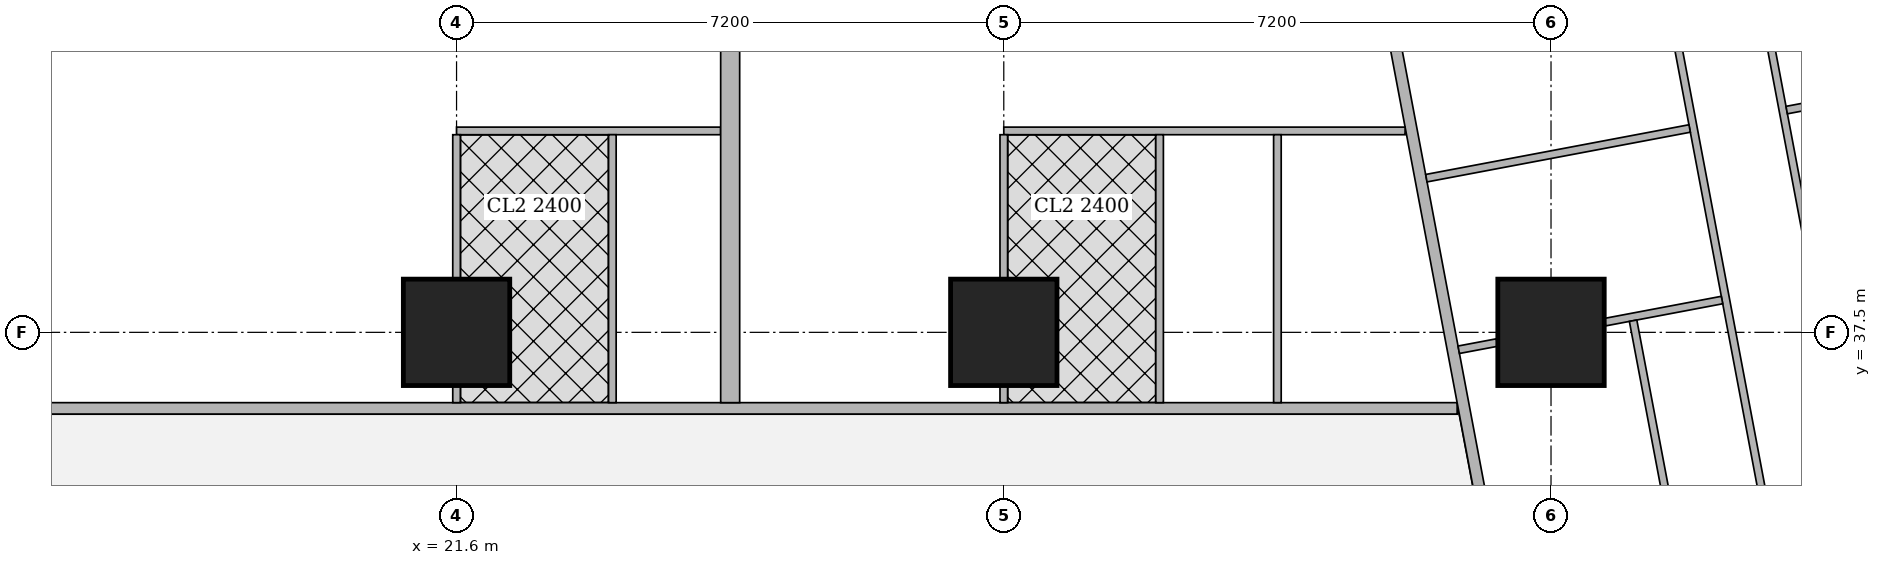
"""IFC4 building model, lengths in metres.
Left out: names, types, materials, properties, quantities, classifications, styles, units other than length and angle.
Written with IfcOpenShell. Run it as: python <this file> out.ifc"""

import sys

from ifc_helpers import new_model, si_unit, direction, frame, frame_2d, origin, origin_2d, place, context, subcontext, project, spatial, rectangle, extrude, element, fill, save


model = new_model("IFC4")
c1 = context("Model", 3, precision=1e-05, world=origin(), true_north=direction((0.0, 1.0)))
c2 = subcontext(c1, "Body", "Model", "MODEL_VIEW")
j1 = project(units=[si_unit("LENGTHUNIT", "METRE"), si_unit("PLANEANGLEUNIT", "RADIAN")], contexts=[c1])
p1 = place(None, origin())
s1 = spatial("IfcSite", under=j1, at=p1, CompositionType="ELEMENT")
p2 = place(p1, origin())
s2 = spatial("IfcBuilding", under=s1, at=p2, CompositionType="ELEMENT")
p3 = place(p2, frame((0.0, 0.0, 223.7)))
s3 = spatial("IfcBuildingStorey", under=s2, at=p3, CompositionType="ELEMENT", Elevation=223.7)
for number, where, z_axis, x_axis in (
    (1, (21.6, 37.5, 0.0), (0.0, 0.0, 1.0), (1.0, 0.0, 0.0)),
    (2, (28.8, 37.5, 0.0), (0.0, 0.0, 1.0), (1.0, 0.0, 0.0)),
    (3, (36.0, 37.5, 0.0), (0.0, 0.0, 1.0), (1.0, 0.0, 0.0)),
):
    element("IfcColumn", number, at=place(p3, frame(where, z_axis=z_axis, x_axis=x_axis)), inside=s3, PredefinedType="COLUMN", context=c2, shape_type="SweptSolid", body=[
        extrude(rectangle(XDim=1.4, YDim=1.4, at=origin_2d()), origin(), (0.0, 0.0, 1.0), 3.75),
    ])
p4 = place(p3, frame((16.201, 36.5, 0.0), z_axis=(0.0, 0.0, 1.0), x_axis=(1.0, 0.0, 0.0)))
e4 = element("IfcWall", 4, at=p4, inside=s3, PredefinedType="SOLIDWALL", context=c2, shape_type="SweptSolid", body=[
    extrude(rectangle(XDim=18.564, YDim=0.15, at=frame_2d((9.282, 0.0))), origin(), (0.0, 0.0, 1.0), 3.5),
])
p5 = place(p4, frame((0.874, 0.0, 0.0)))
e5 = element("IfcOpeningElement", 5, at=p5, cuts=e4, PredefinedType="OPENING", context=c2, shape_type="SweptSolid", body=[
    extrude(rectangle(XDim=1.0, YDim=2.1, at=frame_2d((0.5, 1.05))), frame((0.0, 0.085, 0.0), z_axis=(0.0, -1.0, 0.0), x_axis=(1.0, 0.0, 0.0)), (0.0, 0.0, 1.0), 0.17),
])
p6 = place(p4, frame((10.156, 0.0, 0.0)))
e6 = element("IfcOpeningElement", 6, at=p6, cuts=e4, PredefinedType="OPENING", context=c2, shape_type="SweptSolid", body=[
    extrude(rectangle(XDim=1.0, YDim=2.1, at=frame_2d((0.5, 1.05))), frame((0.0, 0.085, 0.0), z_axis=(0.0, -1.0, 0.0), x_axis=(1.0, 0.0, 0.0)), (0.0, 0.0, 1.0), 0.17),
])
p7 = place(p3, frame((33.68, 42.723, 0.0), z_axis=(0.0, 0.0, 1.0), x_axis=(0.185601160014, -0.982625162207, 0.0)))
e7 = element("IfcWall", 7, at=p7, inside=s3, PredefinedType="SOLIDWALL", context=c2, shape_type="SweptSolid", body=[
    extrude(rectangle(XDim=41.051, YDim=0.15, at=frame_2d((20.526, 0.0))), origin(), (0.0, 0.0, 1.0), 2.5),
])
p8 = place(p7, frame((16.123, 0.0, 0.0)))
e8 = element("IfcOpeningElement", 8, at=p8, cuts=e7, PredefinedType="OPENING", context=c2, shape_type="SweptSolid", body=[
    extrude(rectangle(XDim=1.0, YDim=2.1, at=frame_2d((0.5, 1.05))), frame((0.0, 0.085, 0.0), z_axis=(0.0, -1.0, 0.0), x_axis=(1.0, 0.0, 0.0)), (0.0, 0.0, 1.0), 0.17),
])
p9 = place(p7, frame((19.938, 0.0, 0.0)))
e9 = element("IfcOpeningElement", 9, at=p9, cuts=e7, PredefinedType="OPENING", context=c2, shape_type="SweptSolid", body=[
    extrude(rectangle(XDim=1.0, YDim=2.1, at=frame_2d((0.5, 1.05))), frame((0.0, 0.085, 0.0), z_axis=(0.0, -1.0, 0.0), x_axis=(1.0, 0.0, 0.0)), (0.0, 0.0, 1.0), 0.17),
])
p10 = place(p7, frame((30.902, 0.0, 0.0)))
e10 = element("IfcOpeningElement", 10, at=p10, cuts=e7, PredefinedType="OPENING", context=c2, shape_type="SweptSolid", body=[
    extrude(rectangle(XDim=1.0, YDim=2.1, at=frame_2d((0.5, 1.05))), frame((0.0, 0.085, 0.0), z_axis=(0.0, -1.0, 0.0), x_axis=(1.0, 0.0, 0.0)), (0.0, 0.0, 1.0), 0.17),
])
p11 = place(p3, frame((38.764, 41.941, 0.0), z_axis=(0.0, 0.0, 1.0), x_axis=(0.185512176227, -0.982641965556, 0.0)))
e11 = element("IfcWall", 11, at=p11, inside=s3, PredefinedType="PARTITIONING", context=c2, shape_type="SweptSolid", body=[
    extrude(rectangle(XDim=12.792, YDim=0.1, at=frame_2d((6.396, 0.0))), origin(), (0.0, 0.0, 1.0), 2.5),
])
p12 = place(p11, frame((11.35, 0.0, 0.0)))
e12 = element("IfcOpeningElement", 12, at=p12, cuts=e11, PredefinedType="OPENING", context=c2, shape_type="SweptSolid", body=[
    extrude(rectangle(XDim=0.9, YDim=2.1, at=frame_2d((0.45, 1.05))), frame((0.0, 0.06, 0.0), z_axis=(0.0, -1.0, 0.0), x_axis=(1.0, 0.0, 0.0)), (0.0, 0.0, 1.0), 0.12),
])
p13 = place(p11, frame((8.085, 0.0, 0.0)))
e13 = element("IfcOpeningElement", 13, at=p13, cuts=e11, PredefinedType="OPENING", context=c2, shape_type="SweptSolid", body=[
    extrude(rectangle(XDim=0.9, YDim=2.1, at=frame_2d((0.45, 1.05))), frame((0.0, 0.06, 0.0), z_axis=(0.0, -1.0, 0.0), x_axis=(1.0, 0.0, 0.0)), (0.0, 0.0, 1.0), 0.12),
])
p14 = place(p11, frame((3.7, 0.0, 0.0)))
e14 = element("IfcOpeningElement", 14, at=p14, cuts=e11, PredefinedType="OPENING", context=c2, shape_type="SweptSolid", body=[
    extrude(rectangle(XDim=0.9, YDim=2.1, at=frame_2d((0.45, 1.05))), frame((0.0, 0.06, 0.0), z_axis=(0.0, -1.0, 0.0), x_axis=(1.0, 0.0, 0.0)), (0.0, 0.0, 1.0), 0.12),
])
p15 = place(p3, frame((37.473, 42.309, 0.0), z_axis=(0.0, 0.0, 1.0), x_axis=(0.185570636839, -0.982630927024, 0.0)))
e15 = element("IfcWall", 15, at=p15, inside=s3, PredefinedType="PARTITIONING", context=c2, shape_type="SweptSolid", body=[
    extrude(rectangle(XDim=13.553, YDim=0.1, at=frame_2d((6.777, 0.0))), origin(), (0.0, 0.0, 1.0), 2.5),
])
p16 = place(p15, frame((12.128, 0.0, 0.0)))
e16 = element("IfcOpeningElement", 16, at=p16, cuts=e15, PredefinedType="OPENING", context=c2, shape_type="SweptSolid", body=[
    extrude(rectangle(XDim=0.9, YDim=2.1, at=frame_2d((0.45, 1.05))), frame((0.0, 0.06, 0.0), z_axis=(0.0, -1.0, 0.0), x_axis=(1.0, 0.0, 0.0)), (0.0, 0.0, 1.0), 0.12),
])
p17 = place(p15, frame((8.487, 0.0, 0.0)))
e17 = element("IfcOpeningElement", 17, at=p17, cuts=e15, PredefinedType="OPENING", context=c2, shape_type="SweptSolid", body=[
    extrude(rectangle(XDim=0.9, YDim=2.1, at=frame_2d((0.45, 1.05))), frame((0.0, 0.06, 0.0), z_axis=(0.0, -1.0, 0.0), x_axis=(1.0, 0.0, 0.0)), (0.0, 0.0, 1.0), 0.12),
])
p18 = place(p15, frame((2.853, 0.0, 0.0)))
e18 = element("IfcOpeningElement", 18, at=p18, cuts=e15, PredefinedType="OPENING", context=c2, shape_type="SweptSolid", body=[
    extrude(rectangle(XDim=0.9, YDim=2.1, at=frame_2d((0.45, 1.05))), frame((0.0, 0.06, 0.0), z_axis=(0.0, -1.0, 0.0), x_axis=(1.0, 0.0, 0.0)), (0.0, 0.0, 1.0), 0.12),
])
p19 = place(p15, frame((10.22, 0.0, 0.0)))
e19 = element("IfcOpeningElement", 19, at=p19, cuts=e15, PredefinedType="OPENING", context=c2, shape_type="SweptSolid", body=[
    extrude(rectangle(XDim=0.9, YDim=2.1, at=frame_2d((0.45, 1.05))), frame((0.0, 0.06, 0.0), z_axis=(0.0, -1.0, 0.0), x_axis=(1.0, 0.0, 0.0)), (0.0, 0.0, 1.0), 0.12),
])
p20 = place(p15, frame((5.819, 0.0, 0.0)))
e20 = element("IfcOpeningElement", 20, at=p20, cuts=e15, PredefinedType="OPENING", context=c2, shape_type="SweptSolid", body=[
    extrude(rectangle(XDim=0.9, YDim=2.1, at=frame_2d((0.45, 1.05))), frame((0.0, 0.06, 0.0), z_axis=(0.0, -1.0, 0.0), x_axis=(1.0, 0.0, 0.0)), (0.0, 0.0, 1.0), 0.12),
])
p21 = place(p3, frame((43.277, 41.212, 0.0), z_axis=(0.0, 0.0, 1.0), x_axis=(-0.982665405803, -0.185387972203, 0.0)))
e21 = element("IfcWall", 21, at=p21, inside=s3, PredefinedType="PARTITIONING", context=c2, shape_type="SweptSolid", body=[
    extrude(rectangle(XDim=4.25, YDim=0.1, at=frame_2d((2.125, 0.0))), origin(), (0.0, 0.0, 1.0), 2.05),
])
p22 = place(p3, frame((37.824, 40.182, 0.0), z_axis=(0.0, 0.0, 1.0), x_axis=(-0.982648794755, -0.185475998897, 0.0)))
e22 = element("IfcWall", 22, at=p22, inside=s3, PredefinedType="PARTITIONING", context=c2, shape_type="SweptSolid", body=[
    extrude(rectangle(XDim=3.525, YDim=0.1, at=frame_2d((1.763, 0.0))), origin(), (0.0, 0.0, 1.0), 3.5),
])
p23 = place(p3, frame((38.25, 37.925, 0.0), z_axis=(0.0, 0.0, 1.0), x_axis=(-0.982610209589, -0.185680305934, 0.0)))
e23 = element("IfcWall", 23, at=p23, inside=s3, PredefinedType="PARTITIONING", context=c2, shape_type="SweptSolid", body=[
    extrude(rectangle(XDim=1.567, YDim=0.1, at=frame_2d((0.784, 0.0))), origin(), (0.0, 0.0, 1.0), 3.5),
])
p24 = place(p3, frame((35.29, 37.366, 0.0), z_axis=(0.0, 0.0, 1.0), x_axis=(-0.982715597703, -0.185121727606, 0.0)))
e24 = element("IfcWall", 24, at=p24, inside=s3, PredefinedType="PARTITIONING", context=c2, shape_type="SweptSolid", body=[
    extrude(rectangle(XDim=0.513, YDim=0.1, at=frame_2d((0.256, 0.0))), origin(), (0.0, 0.0, 1.0), 3.5),
])
p25 = place(p3, frame((21.6, 40.15, 0.0), z_axis=(0.0, 0.0, 1.0), x_axis=(1.0, 0.0, 0.0)))
e25 = element("IfcWall", 25, at=p25, inside=s3, PredefinedType="PARTITIONING", context=c2, shape_type="SweptSolid", body=[
    extrude(rectangle(XDim=3.475, YDim=0.1, at=frame_2d((1.737, 0.0))), origin(), (0.0, 0.0, 1.0), 3.5),
])
p26 = place(p25, frame((0.575, 0.0, 0.0)))
e26 = element("IfcOpeningElement", 26, at=p26, cuts=e25, PredefinedType="OPENING", context=c2, shape_type="SweptSolid", body=[
    extrude(rectangle(XDim=0.9, YDim=2.1, at=frame_2d((0.45, 1.05))), frame((0.0, 0.06, 0.0), z_axis=(0.0, -1.0, 0.0), x_axis=(1.0, 0.0, 0.0)), (0.0, 0.0, 1.0), 0.12),
])
p27 = place(p25, frame((2.375, 0.0, 0.0)))
e27 = element("IfcOpeningElement", 27, at=p27, cuts=e25, PredefinedType="OPENING", context=c2, shape_type="SweptSolid", body=[
    extrude(rectangle(XDim=0.9, YDim=2.1, at=frame_2d((0.45, 1.05))), frame((0.0, 0.06, 0.0), z_axis=(0.0, -1.0, 0.0), x_axis=(1.0, 0.0, 0.0)), (0.0, 0.0, 1.0), 0.12),
])
p28 = place(p3, frame((21.6, 36.575, 0.0), z_axis=(0.0, 0.0, 1.0), x_axis=(0.0, 1.0, 0.0)))
e28 = element("IfcWall", 28, at=p28, inside=s3, PredefinedType="PARTITIONING", context=c2, shape_type="SweptSolid", body=[
    extrude(rectangle(XDim=0.224, YDim=0.1, at=frame_2d((0.112, 0.0))), origin(), (0.0, 0.0, 1.0), 3.5),
])
p29 = place(p3, frame((21.6, 38.201, 0.0), z_axis=(0.0, 0.0, 1.0), x_axis=(0.0, 1.0, 0.0)))
e29 = element("IfcWall", 29, at=p29, inside=s3, PredefinedType="PARTITIONING", context=c2, shape_type="SweptSolid", body=[
    extrude(rectangle(XDim=1.899, YDim=0.1, at=frame_2d((0.95, 0.0))), origin(), (0.0, 0.0, 1.0), 3.5),
])
p30 = place(p3, frame((23.65, 36.575, 0.0), z_axis=(0.0, 0.0, 1.0), x_axis=(0.0, 1.0, 0.0)))
e30 = element("IfcWall", 30, at=p30, inside=s3, PredefinedType="PARTITIONING", context=c2, shape_type="SweptSolid", body=[
    extrude(rectangle(XDim=3.525, YDim=0.1, at=frame_2d((1.763, 0.0))), origin(), (0.0, 0.0, 1.0), 3.5),
])
p31 = place(p3, frame((28.8, 40.15, 0.0), z_axis=(0.0, 0.0, 1.0), x_axis=(1.0, 0.0, 0.0)))
e31 = element("IfcWall", 31, at=p31, inside=s3, PredefinedType="PARTITIONING", context=c2, shape_type="SweptSolid", body=[
    extrude(rectangle(XDim=5.28, YDim=0.1, at=frame_2d((2.64, 0.0))), origin(), (0.0, 0.0, 1.0), 3.5),
])
p32 = place(p31, frame((0.575, 0.0, 0.0)))
e32 = element("IfcOpeningElement", 32, at=p32, cuts=e31, PredefinedType="OPENING", context=c2, shape_type="SweptSolid", body=[
    extrude(rectangle(XDim=0.9, YDim=2.1, at=frame_2d((0.45, 1.05))), frame((0.0, 0.06, 0.0), z_axis=(0.0, -1.0, 0.0), x_axis=(1.0, 0.0, 0.0)), (0.0, 0.0, 1.0), 0.12),
])
p33 = place(p31, frame((4.23, 0.0, 0.0)))
e33 = element("IfcOpeningElement", 33, at=p33, cuts=e31, PredefinedType="OPENING", context=c2, shape_type="SweptSolid", body=[
    extrude(rectangle(XDim=0.9, YDim=2.1, at=frame_2d((0.45, 1.05))), frame((0.0, 0.06, 0.0), z_axis=(0.0, -1.0, 0.0), x_axis=(1.0, 0.0, 0.0)), (0.0, 0.0, 1.0), 0.12),
])
p34 = place(p31, frame((2.375, 0.0, 0.0)))
e34 = element("IfcOpeningElement", 34, at=p34, cuts=e31, PredefinedType="OPENING", context=c2, shape_type="SweptSolid", body=[
    extrude(rectangle(XDim=0.9, YDim=2.1, at=frame_2d((0.45, 1.05))), frame((0.0, 0.06, 0.0), z_axis=(0.0, -1.0, 0.0), x_axis=(1.0, 0.0, 0.0)), (0.0, 0.0, 1.0), 0.12),
])
p35 = place(p3, frame((28.8, 36.575, 0.0), z_axis=(0.0, 0.0, 1.0), x_axis=(0.0, 1.0, 0.0)))
e35 = element("IfcWall", 35, at=p35, inside=s3, PredefinedType="PARTITIONING", context=c2, shape_type="SweptSolid", body=[
    extrude(rectangle(XDim=0.224, YDim=0.1, at=frame_2d((0.112, 0.0))), origin(), (0.0, 0.0, 1.0), 3.5),
])
p36 = place(p3, frame((28.8, 38.201, 0.0), z_axis=(0.0, 0.0, 1.0), x_axis=(0.0, 1.0, 0.0)))
e36 = element("IfcWall", 36, at=p36, inside=s3, PredefinedType="PARTITIONING", context=c2, shape_type="SweptSolid", body=[
    extrude(rectangle(XDim=1.899, YDim=0.1, at=frame_2d((0.95, 0.0))), origin(), (0.0, 0.0, 1.0), 3.5),
])
for number, where, z_axis, x_axis in (
    (37, (32.4, 36.575, 0.0), (0.0, 0.0, 1.0), (0.0, 1.0, 0.0)),
    (38, (30.85, 36.575, 0.0), (0.0, 0.0, 1.0), (0.0, 1.0, 0.0)),
):
    element("IfcWall", number, at=place(p3, frame(where, z_axis=z_axis, x_axis=x_axis)), inside=s3, PredefinedType="PARTITIONING", context=c2, shape_type="SweptSolid", body=[
        extrude(rectangle(XDim=3.525, YDim=0.1, at=frame_2d((1.763, 0.0))), origin(), (0.0, 0.0, 1.0), 3.5),
    ])
p37 = place(p3, frame((25.2, 36.575, 0.0), z_axis=(0.0, 0.0, 1.0), x_axis=(0.0, 1.0, 0.0)))
e39 = element("IfcWall", 39, at=p37, inside=s3, PredefinedType="SOLIDWALL", context=c2, shape_type="SweptSolid", body=[
    extrude(rectangle(XDim=4.775, YDim=0.25, at=frame_2d((2.388, 0.0))), origin(), (0.0, 0.0, 1.0), 3.5),
])
p38 = place(p3, frame((37.08, 37.653, 0.0), z_axis=(0.0, 0.0, 1.0), x_axis=(0.185864634688, -0.982575359742, 0.0)))
e40 = element("IfcWall", 40, at=p38, inside=s3, PredefinedType="PARTITIONING", context=c2, shape_type="SweptSolid", body=[
    extrude(rectangle(XDim=3.535, YDim=0.1, at=frame_2d((1.767, 0.0))), origin(), (0.0, 0.0, 1.0), 3.5),
])
p39 = place(p38, frame((1.317, 0.0, 0.0)))
e41 = element("IfcOpeningElement", 41, at=p39, cuts=e40, PredefinedType="OPENING", context=c2, shape_type="SweptSolid", body=[
    extrude(rectangle(XDim=0.9, YDim=2.1, at=frame_2d((0.45, 1.05))), frame((0.0, 0.06, 0.0), z_axis=(0.0, -1.0, 0.0), x_axis=(1.0, 0.0, 0.0)), (0.0, 0.0, 1.0), 0.12),
])
p40 = place(p18, origin())
e42 = element("IfcDoor", 42, at=p40, inside=s3, OperationType="SINGLE_SWING_LEFT", PredefinedType="DOOR", context=c2, shape_type="SweptSolid", body=[
    extrude(rectangle(XDim=0.9, YDim=2.1, at=frame_2d((0.45, 1.05))), frame((0.0, 0.025, 0.0), z_axis=(0.0, -1.0, 0.0), x_axis=(1.0, 0.0, 0.0)), (0.0, 0.0, 1.0), 0.05),
])
fill(e18, e42)
p41 = place(p20, origin())
e43 = element("IfcDoor", 43, at=p41, inside=s3, OperationType="SINGLE_SWING_RIGHT", PredefinedType="DOOR", context=c2, shape_type="SweptSolid", body=[
    extrude(rectangle(XDim=0.9, YDim=2.1, at=frame_2d((0.45, 1.05))), frame((0.0, 0.025, 0.0), z_axis=(0.0, -1.0, 0.0), x_axis=(1.0, 0.0, 0.0)), (0.0, 0.0, 1.0), 0.05),
])
fill(e20, e43)
p42 = place(p26, origin())
e44 = element("IfcDoor", 44, at=p42, inside=s3, OperationType="SINGLE_SWING_RIGHT", PredefinedType="DOOR", context=c2, shape_type="SweptSolid", body=[
    extrude(rectangle(XDim=0.9, YDim=2.1, at=frame_2d((0.45, 1.05))), frame((0.0, 0.025, 0.0), z_axis=(0.0, -1.0, 0.0), x_axis=(1.0, 0.0, 0.0)), (0.0, 0.0, 1.0), 0.05),
])
fill(e26, e44)
p43 = place(p27, origin())
e45 = element("IfcDoor", 45, at=p43, inside=s3, OperationType="SINGLE_SWING_LEFT", PredefinedType="DOOR", context=c2, shape_type="SweptSolid", body=[
    extrude(rectangle(XDim=0.9, YDim=2.1, at=frame_2d((0.45, 1.05))), frame((0.0, 0.025, 0.0), z_axis=(0.0, -1.0, 0.0), x_axis=(1.0, 0.0, 0.0)), (0.0, 0.0, 1.0), 0.05),
])
fill(e27, e45)
p44 = place(p5, origin())
e46 = element("IfcDoor", 46, at=p44, inside=s3, OperationType="SINGLE_SWING_LEFT", PredefinedType="DOOR", context=c2, shape_type="SweptSolid", body=[
    extrude(rectangle(XDim=1.0, YDim=2.1, at=frame_2d((0.5, 1.05))), frame((0.0, 0.025, 0.0), z_axis=(0.0, -1.0, 0.0), x_axis=(1.0, 0.0, 0.0)), (0.0, 0.0, 1.0), 0.05),
])
fill(e5, e46)
p45 = place(p32, origin())
e47 = element("IfcDoor", 47, at=p45, inside=s3, OperationType="SINGLE_SWING_RIGHT", PredefinedType="DOOR", context=c2, shape_type="SweptSolid", body=[
    extrude(rectangle(XDim=0.9, YDim=2.1, at=frame_2d((0.45, 1.05))), frame((0.0, 0.025, 0.0), z_axis=(0.0, -1.0, 0.0), x_axis=(1.0, 0.0, 0.0)), (0.0, 0.0, 1.0), 0.05),
])
fill(e32, e47)
p46 = place(p33, origin())
e48 = element("IfcDoor", 48, at=p46, inside=s3, OperationType="SINGLE_SWING_LEFT", PredefinedType="DOOR", context=c2, shape_type="SweptSolid", body=[
    extrude(rectangle(XDim=0.9, YDim=2.1, at=frame_2d((0.45, 1.05))), frame((0.0, 0.025, 0.0), z_axis=(0.0, -1.0, 0.0), x_axis=(1.0, 0.0, 0.0)), (0.0, 0.0, 1.0), 0.05),
])
fill(e33, e48)
p47 = place(p34, origin())
e49 = element("IfcDoor", 49, at=p47, inside=s3, OperationType="SINGLE_SWING_LEFT", PredefinedType="DOOR", context=c2, shape_type="SweptSolid", body=[
    extrude(rectangle(XDim=0.9, YDim=2.1, at=frame_2d((0.45, 1.05))), frame((0.0, 0.025, 0.0), z_axis=(0.0, -1.0, 0.0), x_axis=(1.0, 0.0, 0.0)), (0.0, 0.0, 1.0), 0.05),
])
fill(e34, e49)
p48 = place(p6, origin())
e50 = element("IfcDoor", 50, at=p48, inside=s3, OperationType="SINGLE_SWING_LEFT", PredefinedType="DOOR", context=c2, shape_type="SweptSolid", body=[
    extrude(rectangle(XDim=1.0, YDim=2.1, at=frame_2d((0.5, 1.05))), frame((0.0, 0.025, 0.0), z_axis=(0.0, -1.0, 0.0), x_axis=(1.0, 0.0, 0.0)), (0.0, 0.0, 1.0), 0.05),
])
fill(e6, e50)
p49 = place(p39, origin())
e51 = element("IfcDoor", 51, at=p49, inside=s3, OperationType="SINGLE_SWING_LEFT", PredefinedType="DOOR", context=c2, shape_type="SweptSolid", body=[
    extrude(rectangle(XDim=0.9, YDim=2.1, at=frame_2d((0.45, 1.05))), frame((0.0, 0.025, 0.0), z_axis=(0.0, -1.0, 0.0), x_axis=(1.0, 0.0, 0.0)), (0.0, 0.0, 1.0), 0.05),
])
fill(e41, e51)
save(model, sys.argv[1])
